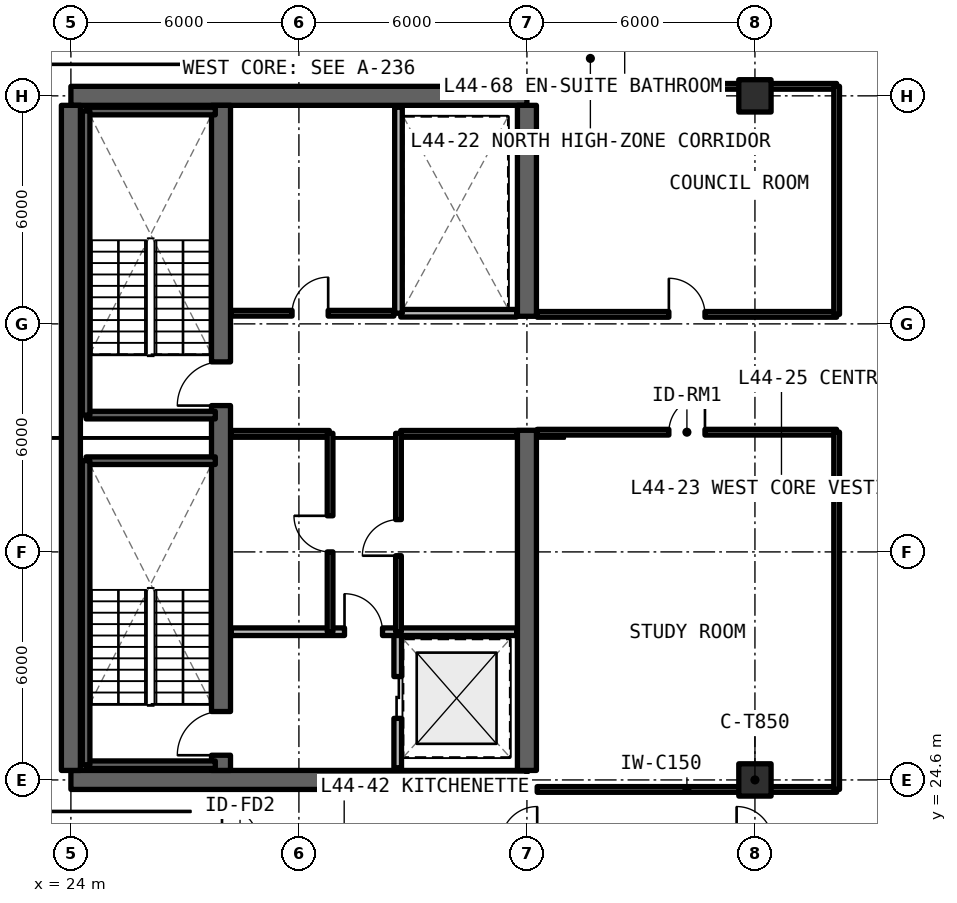
"""IFC4 building model, lengths in metres.
Left out: names, types, materials, properties, quantities, classifications, styles, units other than length and angle.
Written with IfcOpenShell. Run it as: python <this file> out.ifc"""

import sys

from ifc_helpers import new_model, si_unit, direction, frame, frame_2d, origin, origin_2d, place, context, subcontext, project, spatial, rectangle, extrude, element, fill, save


model = new_model("IFC4")
c1 = context("Model", 3, precision=1e-05, world=origin(), true_north=direction((0.0, 1.0)))
c2 = subcontext(c1, "Body", "Model", "MODEL_VIEW")
j1 = project(units=[si_unit("LENGTHUNIT", "METRE"), si_unit("PLANEANGLEUNIT", "RADIAN")], contexts=[c1])
p1 = place(None, origin())
s1 = spatial("IfcSite", under=j1, at=p1, CompositionType="ELEMENT")
p2 = place(p1, origin())
s2 = spatial("IfcBuilding", under=s1, at=p2, CompositionType="ELEMENT")
p3 = place(p2, frame((0.0, 0.0, 158.4)))
s3 = spatial("IfcBuildingStorey", under=s2, at=p3, CompositionType="ELEMENT", Elevation=158.4)
for number, where, z_axis, x_axis in (
    (1, (24.0, 24.6, 0.0), (0.0, 0.0, 1.0), (1.0, 0.0, 0.0)),
    (2, (36.0, 42.6, 0.0), (0.0, 0.0, 1.0), (-1.0, 0.0, 0.0)),
):
    element("IfcWall", number, at=place(p3, frame(where, z_axis=z_axis, x_axis=x_axis)), inside=s3, PredefinedType="SHEAR", context=c2, shape_type="SweptSolid", body=[
        extrude(rectangle(XDim=12.0, YDim=0.5, at=frame_2d((6.0, 0.0))), origin(), (0.0, 0.0, 1.0), 3.63),
    ])
p4 = place(p3, frame((24.0, 24.85, 0.0), z_axis=(0.0, 0.0, 1.0), x_axis=(0.0, 1.0, 0.0)))
e3 = element("IfcWall", 3, at=p4, inside=s3, PredefinedType="SHEAR", context=c2, shape_type="SweptSolid", body=[
    extrude(rectangle(XDim=17.5, YDim=0.5, at=frame_2d((8.75, 0.0))), origin(), (0.0, 0.0, 1.0), 3.63),
])
p5 = place(p3, frame((36.0, 24.85, 0.0), z_axis=(0.0, 0.0, 1.0), x_axis=(0.0, 1.0, 0.0)))
e4 = element("IfcWall", 4, at=p5, inside=s3, PredefinedType="SHEAR", context=c2, shape_type="SweptSolid", body=[
    extrude(rectangle(XDim=8.95, YDim=0.5, at=frame_2d((4.475, 0.0))), origin(), (0.0, 0.0, 1.0), 3.63),
])
p6 = place(p3, frame((36.0, 36.8, 0.0), z_axis=(0.0, 0.0, 1.0), x_axis=(0.0, 1.0, 0.0)))
e5 = element("IfcWall", 5, at=p6, inside=s3, PredefinedType="SHEAR", context=c2, shape_type="SweptSolid", body=[
    extrude(rectangle(XDim=5.55, YDim=0.5, at=frame_2d((2.775, 0.0))), origin(), (0.0, 0.0, 1.0), 3.63),
])
p7 = place(p3, frame((27.95, 24.85, 0.0), z_axis=(0.0, 0.0, 1.0), x_axis=(0.0, 1.0, 0.0)))
e6 = element("IfcWall", 6, at=p7, inside=s3, PredefinedType="SHEAR", context=c2, shape_type="SweptSolid", body=[
    extrude(rectangle(XDim=17.5, YDim=0.5, at=frame_2d((8.75, 0.0))), origin(), (0.0, 0.0, 1.0), 3.63),
])
p8 = place(p7, frame((0.4, 0.0, 0.0)))
e7 = element("IfcOpeningElement", 7, at=p8, cuts=e6, PredefinedType="OPENING", context=c2, shape_type="SweptSolid", body=[
    extrude(rectangle(XDim=1.15, YDim=2.15, at=frame_2d((0.575, 1.075))), frame((0.0, 0.26, 0.0), z_axis=(0.0, -1.0, 0.0), x_axis=(1.0, 0.0, 0.0)), (0.0, 0.0, 1.0), 0.52),
])
p9 = place(p7, frame((9.6, 0.0, 0.0)))
e8 = element("IfcOpeningElement", 8, at=p9, cuts=e6, PredefinedType="OPENING", context=c2, shape_type="SweptSolid", body=[
    extrude(rectangle(XDim=1.15, YDim=2.15, at=frame_2d((0.575, 1.075))), frame((0.0, 0.26, 0.0), z_axis=(0.0, -1.0, 0.0), x_axis=(1.0, 0.0, 0.0)), (0.0, 0.0, 1.0), 0.52),
])
for number, where, z_axis, x_axis in (
    (9, (42.0, 24.6, 0.0), (0.0, 0.0, 1.0), (1.0, 0.0, 0.0)),
    (10, (42.0, 42.6, 0.0), (0.0, 0.0, 1.0), (1.0, 0.0, 0.0)),
):
    element("IfcColumn", number, at=place(p3, frame(where, z_axis=z_axis, x_axis=x_axis)), inside=s3, PredefinedType="COLUMN", context=c2, shape_type="SweptSolid", body=[
        extrude(rectangle(XDim=0.85, YDim=0.85, at=origin_2d()), origin(), (0.0, 0.0, 1.0), 3.63),
    ])
p10 = place(p3, frame((32.6, 24.92, 0.0), z_axis=(0.0, 0.0, 1.0), x_axis=(0.0, 1.0, 0.0)))
e11 = element("IfcWall", 11, at=p10, inside=s3, PredefinedType="SOLIDWALL", context=c2, shape_type="SweptSolid", body=[
    extrude(rectangle(XDim=3.58, YDim=0.2, at=frame_2d((1.79, 0.0))), origin(), (0.0, 0.0, 1.0), 2.63),
])
p11 = place(p10, frame((1.3, 0.0, 0.0)))
e12 = element("IfcOpeningElement", 12, at=p11, cuts=e11, PredefinedType="OPENING", context=c2, shape_type="SweptSolid", body=[
    extrude(rectangle(XDim=1.1, YDim=2.2, at=frame_2d((0.55, 1.1))), frame((0.0, 0.11, 0.0), z_axis=(0.0, -1.0, 0.0), x_axis=(1.0, 0.0, 0.0)), (0.0, 0.0, 1.0), 0.22),
])
p12 = place(p3, frame((28.22, 28.5, 0.0), z_axis=(0.0, 0.0, 1.0), x_axis=(1.0, 0.0, 0.0)))
e13 = element("IfcWall", 13, at=p12, inside=s3, PredefinedType="SOLIDWALL", context=c2, shape_type="SweptSolid", body=[
    extrude(rectangle(XDim=7.51, YDim=0.2, at=frame_2d((3.755, 0.0))), origin(), (0.0, 0.0, 1.0), 2.63),
])
p13 = place(p12, frame((2.98, 0.0, 0.0)))
e14 = element("IfcOpeningElement", 14, at=p13, cuts=e13, PredefinedType="OPENING", context=c2, shape_type="SweptSolid", body=[
    extrude(rectangle(XDim=1.0, YDim=2.15, at=frame_2d((0.5, 1.075))), frame((0.0, 0.11, 0.0), z_axis=(0.0, -1.0, 0.0), x_axis=(1.0, 0.0, 0.0)), (0.0, 0.0, 1.0), 0.22),
])
p14 = place(p3, frame((28.22, 33.72, 0.0), z_axis=(0.0, 0.0, 1.0), x_axis=(1.0, 0.0, 0.0)))
e15 = element("IfcWall", 15, at=p14, inside=s3, PredefinedType="SOLIDWALL", context=c2, shape_type="SweptSolid", body=[
    extrude(rectangle(XDim=2.58, YDim=0.15, at=frame_2d((1.29, 0.0))), origin(), (0.0, 0.0, 1.0), 2.63),
])
p15 = place(p3, frame((30.82, 28.5, 0.0), z_axis=(0.0, 0.0, 1.0), x_axis=(0.0, 1.0, 0.0)))
e16 = element("IfcWall", 16, at=p15, inside=s3, PredefinedType="SOLIDWALL", context=c2, shape_type="SweptSolid", body=[
    extrude(rectangle(XDim=5.22, YDim=0.15, at=frame_2d((2.61, 0.0))), origin(), (0.0, 0.0, 1.0), 2.63),
])
p16 = place(p15, frame((2.1, 0.0, 0.0)))
e17 = element("IfcOpeningElement", 17, at=p16, cuts=e16, PredefinedType="OPENING", context=c2, shape_type="SweptSolid", body=[
    extrude(rectangle(XDim=0.95, YDim=2.15, at=frame_2d((0.475, 1.075))), frame((0.0, 0.085, 0.0), z_axis=(0.0, -1.0, 0.0), x_axis=(1.0, 0.0, 0.0)), (0.0, 0.0, 1.0), 0.17),
])
p17 = place(p3, frame((32.68, 33.72, 0.0), z_axis=(0.0, 0.0, 1.0), x_axis=(1.0, 0.0, 0.0)))
e18 = element("IfcWall", 18, at=p17, inside=s3, PredefinedType="SOLIDWALL", context=c2, shape_type="SweptSolid", body=[
    extrude(rectangle(XDim=3.05, YDim=0.15, at=frame_2d((1.525, 0.0))), origin(), (0.0, 0.0, 1.0), 2.63),
])
p18 = place(p3, frame((32.62, 28.5, 0.0), z_axis=(0.0, 0.0, 1.0), x_axis=(0.0, 1.0, 0.0)))
e19 = element("IfcWall", 19, at=p18, inside=s3, PredefinedType="SOLIDWALL", context=c2, shape_type="SweptSolid", body=[
    extrude(rectangle(XDim=5.22, YDim=0.15, at=frame_2d((2.61, 0.0))), origin(), (0.0, 0.0, 1.0), 2.63),
])
p19 = place(p18, frame((2.0, 0.0, 0.0)))
e20 = element("IfcOpeningElement", 20, at=p19, cuts=e19, PredefinedType="OPENING", context=c2, shape_type="SweptSolid", body=[
    extrude(rectangle(XDim=0.95, YDim=2.15, at=frame_2d((0.475, 1.075))), frame((0.0, 0.085, 0.0), z_axis=(0.0, -1.0, 0.0), x_axis=(1.0, 0.0, 0.0)), (0.0, 0.0, 1.0), 0.17),
])
p20 = place(p3, frame((28.22, 36.88, 0.0), z_axis=(0.0, 0.0, 1.0), x_axis=(1.0, 0.0, 0.0)))
e21 = element("IfcWall", 21, at=p20, inside=s3, PredefinedType="SOLIDWALL", context=c2, shape_type="SweptSolid", body=[
    extrude(rectangle(XDim=4.28, YDim=0.15, at=frame_2d((2.14, 0.0))), origin(), (0.0, 0.0, 1.0), 2.63),
])
p21 = place(p20, frame((1.6, 0.0, 0.0)))
e22 = element("IfcOpeningElement", 22, at=p21, cuts=e21, PredefinedType="OPENING", context=c2, shape_type="SweptSolid", body=[
    extrude(rectangle(XDim=0.95, YDim=2.15, at=frame_2d((0.475, 1.075))), frame((0.0, 0.085, 0.0), z_axis=(0.0, -1.0, 0.0), x_axis=(1.0, 0.0, 0.0)), (0.0, 0.0, 1.0), 0.17),
])
p22 = place(p3, frame((32.68, 36.88, 0.0), z_axis=(0.0, 0.0, 1.0), x_axis=(1.0, 0.0, 0.0)))
e23 = element("IfcWall", 23, at=p22, inside=s3, PredefinedType="SOLIDWALL", context=c2, shape_type="SweptSolid", body=[
    extrude(rectangle(XDim=3.05, YDim=0.2, at=frame_2d((1.525, 0.0))), origin(), (0.0, 0.0, 1.0), 2.63),
])
p23 = place(p3, frame((32.62, 36.88, 0.0), z_axis=(0.0, 0.0, 1.0), x_axis=(0.0, 1.0, 0.0)))
e24 = element("IfcWall", 24, at=p23, inside=s3, PredefinedType="SOLIDWALL", context=c2, shape_type="SweptSolid", body=[
    extrude(rectangle(XDim=5.42, YDim=0.2, at=frame_2d((2.71, 0.0))), origin(), (0.0, 0.0, 1.0), 2.63),
])
p24 = place(p3, frame((36.27, 24.35, 0.0), z_axis=(0.0, 0.0, 1.0), x_axis=(1.0, 0.0, 0.0)))
e25 = element("IfcWall", 25, at=p24, inside=s3, PredefinedType="SOLIDWALL", context=c2, shape_type="SweptSolid", body=[
    extrude(rectangle(XDim=7.88, YDim=0.15, at=frame_2d((3.94, 0.0))), origin(), (0.0, 0.0, 1.0), 2.63),
])
p25 = place(p3, frame((36.27, 33.75, 0.0), z_axis=(0.0, 0.0, 1.0), x_axis=(1.0, 0.0, 0.0)))
e26 = element("IfcWall", 26, at=p25, inside=s3, PredefinedType="SOLIDWALL", context=c2, shape_type="SweptSolid", body=[
    extrude(rectangle(XDim=7.88, YDim=0.15, at=frame_2d((3.94, 0.0))), origin(), (0.0, 0.0, 1.0), 2.63),
])
p26 = place(p25, frame((3.465, 0.0, 0.0)))
e27 = element("IfcOpeningElement", 27, at=p26, cuts=e26, PredefinedType="OPENING", context=c2, shape_type="SweptSolid", body=[
    extrude(rectangle(XDim=0.95, YDim=2.15, at=frame_2d((0.475, 1.075))), frame((0.0, 0.085, 0.0), z_axis=(0.0, -1.0, 0.0), x_axis=(1.0, 0.0, 0.0)), (0.0, 0.0, 1.0), 0.17),
])
p27 = place(p3, frame((44.15, 24.35, 0.0), z_axis=(0.0, 0.0, 1.0), x_axis=(0.0, 1.0, 0.0)))
e28 = element("IfcWall", 28, at=p27, inside=s3, PredefinedType="SOLIDWALL", context=c2, shape_type="SweptSolid", body=[
    extrude(rectangle(XDim=9.4, YDim=0.15, at=frame_2d((4.7, 0.0))), origin(), (0.0, 0.0, 1.0), 2.63),
])
p28 = place(p3, frame((36.27, 36.85, 0.0), z_axis=(0.0, 0.0, 1.0), x_axis=(1.0, 0.0, 0.0)))
e29 = element("IfcWall", 29, at=p28, inside=s3, PredefinedType="SOLIDWALL", context=c2, shape_type="SweptSolid", body=[
    extrude(rectangle(XDim=7.88, YDim=0.15, at=frame_2d((3.94, 0.0))), origin(), (0.0, 0.0, 1.0), 2.63),
])
p29 = place(p28, frame((3.465, 0.0, 0.0)))
e30 = element("IfcOpeningElement", 30, at=p29, cuts=e29, PredefinedType="OPENING", context=c2, shape_type="SweptSolid", body=[
    extrude(rectangle(XDim=0.95, YDim=2.15, at=frame_2d((0.475, 1.075))), frame((0.0, 0.085, 0.0), z_axis=(0.0, -1.0, 0.0), x_axis=(1.0, 0.0, 0.0)), (0.0, 0.0, 1.0), 0.17),
])
p30 = place(p3, frame((36.27, 42.85, 0.0), z_axis=(0.0, 0.0, 1.0), x_axis=(1.0, 0.0, 0.0)))
e31 = element("IfcWall", 31, at=p30, inside=s3, PredefinedType="SOLIDWALL", context=c2, shape_type="SweptSolid", body=[
    extrude(rectangle(XDim=7.88, YDim=0.15, at=frame_2d((3.94, 0.0))), origin(), (0.0, 0.0, 1.0), 2.63),
])
p31 = place(p3, frame((44.15, 36.85, 0.0), z_axis=(0.0, 0.0, 1.0), x_axis=(0.0, 1.0, 0.0)))
e32 = element("IfcWall", 32, at=p31, inside=s3, PredefinedType="SOLIDWALL", context=c2, shape_type="SweptSolid", body=[
    extrude(rectangle(XDim=6.0, YDim=0.15, at=frame_2d((3.0, 0.0))), origin(), (0.0, 0.0, 1.0), 2.63),
])
for number, where, z_axis, x_axis in (
    (33, (24.4, 25.0, 0.0), (0.0, 0.0, 1.0), (1.0, 0.0, 0.0)),
    (34, (27.8, 33.0, 0.0), (0.0, 0.0, 1.0), (-1.0, 0.0, 0.0)),
):
    element("IfcWall", number, at=place(p3, frame(where, z_axis=z_axis, x_axis=x_axis)), inside=s3, PredefinedType="SOLIDWALL", context=c2, shape_type="SweptSolid", body=[
        extrude(rectangle(XDim=3.4, YDim=0.2, at=frame_2d((1.7, 0.0))), origin(), (0.0, 0.0, 1.0), 3.63),
    ])
p32 = place(p3, frame((24.4, 33.0, 0.0), z_axis=(0.0, 0.0, 1.0), x_axis=(0.0, -1.0, 0.0)))
e35 = element("IfcWall", 35, at=p32, inside=s3, PredefinedType="SOLIDWALL", context=c2, shape_type="SweptSolid", body=[
    extrude(rectangle(XDim=8.0, YDim=0.2, at=frame_2d((4.0, 0.0))), origin(), (0.0, 0.0, 1.0), 3.63),
])
for number, where, z_axis, x_axis in (
    (36, (24.4, 34.2, 0.0), (0.0, 0.0, 1.0), (1.0, 0.0, 0.0)),
    (37, (27.8, 42.2, 0.0), (0.0, 0.0, 1.0), (-1.0, 0.0, 0.0)),
):
    element("IfcWall", number, at=place(p3, frame(where, z_axis=z_axis, x_axis=x_axis)), inside=s3, PredefinedType="SOLIDWALL", context=c2, shape_type="SweptSolid", body=[
        extrude(rectangle(XDim=3.4, YDim=0.2, at=frame_2d((1.7, 0.0))), origin(), (0.0, 0.0, 1.0), 3.63),
    ])
p33 = place(p3, frame((24.4, 42.2, 0.0), z_axis=(0.0, 0.0, 1.0), x_axis=(0.0, -1.0, 0.0)))
e38 = element("IfcWall", 38, at=p33, inside=s3, PredefinedType="SOLIDWALL", context=c2, shape_type="SweptSolid", body=[
    extrude(rectangle(XDim=8.0, YDim=0.2, at=frame_2d((4.0, 0.0))), origin(), (0.0, 0.0, 1.0), 3.63),
])
p34 = place(p11, origin())
e39 = element("IfcDoor", 39, at=p34, inside=s3, OperationType="SLIDING_TO_LEFT", PredefinedType="DOOR", context=c2, shape_type="SweptSolid", body=[
    extrude(rectangle(XDim=1.1, YDim=2.2, at=frame_2d((0.55, 1.1))), frame((0.0, 0.025, 0.0), z_axis=(0.0, -1.0, 0.0), x_axis=(1.0, 0.0, 0.0)), (0.0, 0.0, 1.0), 0.05),
])
fill(e12, e39)
p35 = place(p13, origin())
e40 = element("IfcDoor", 40, at=p35, inside=s3, OperationType="SINGLE_SWING_LEFT", PredefinedType="DOOR", context=c2, shape_type="SweptSolid", body=[
    extrude(rectangle(XDim=1.0, YDim=2.15, at=frame_2d((0.5, 1.075))), frame((0.0, 0.025, 0.0), z_axis=(0.0, -1.0, 0.0), x_axis=(1.0, 0.0, 0.0)), (0.0, 0.0, 1.0), 0.05),
])
fill(e14, e40)
p36 = place(p16, origin())
e41 = element("IfcDoor", 41, at=p36, inside=s3, OperationType="SINGLE_SWING_RIGHT", PredefinedType="DOOR", context=c2, shape_type="SweptSolid", body=[
    extrude(rectangle(XDim=0.95, YDim=2.15, at=frame_2d((0.475, 1.075))), frame((0.0, 0.025, 0.0), z_axis=(0.0, -1.0, 0.0), x_axis=(1.0, 0.0, 0.0)), (0.0, 0.0, 1.0), 0.05),
])
fill(e17, e41)
p37 = place(p19, origin())
e42 = element("IfcDoor", 42, at=p37, inside=s3, OperationType="SINGLE_SWING_LEFT", PredefinedType="DOOR", context=c2, shape_type="SweptSolid", body=[
    extrude(rectangle(XDim=0.95, YDim=2.15, at=frame_2d((0.475, 1.075))), frame((0.0, 0.025, 0.0), z_axis=(0.0, -1.0, 0.0), x_axis=(1.0, 0.0, 0.0)), (0.0, 0.0, 1.0), 0.05),
])
fill(e20, e42)
p38 = place(p21, origin())
e43 = element("IfcDoor", 43, at=p38, inside=s3, OperationType="SINGLE_SWING_RIGHT", PredefinedType="DOOR", context=c2, shape_type="SweptSolid", body=[
    extrude(rectangle(XDim=0.95, YDim=2.15, at=frame_2d((0.475, 1.075))), frame((0.0, 0.025, 0.0), z_axis=(0.0, -1.0, 0.0), x_axis=(1.0, 0.0, 0.0)), (0.0, 0.0, 1.0), 0.05),
])
fill(e22, e43)
p39 = place(p26, origin())
e44 = element("IfcDoor", 44, at=p39, inside=s3, OperationType="SINGLE_SWING_RIGHT", PredefinedType="DOOR", context=c2, shape_type="SweptSolid", body=[
    extrude(rectangle(XDim=0.95, YDim=2.15, at=frame_2d((0.475, 1.075))), frame((0.0, 0.025, 0.0), z_axis=(0.0, -1.0, 0.0), x_axis=(1.0, 0.0, 0.0)), (0.0, 0.0, 1.0), 0.05),
])
fill(e27, e44)
p40 = place(p29, origin())
e45 = element("IfcDoor", 45, at=p40, inside=s3, OperationType="SINGLE_SWING_LEFT", PredefinedType="DOOR", context=c2, shape_type="SweptSolid", body=[
    extrude(rectangle(XDim=0.95, YDim=2.15, at=frame_2d((0.475, 1.075))), frame((0.0, 0.025, 0.0), z_axis=(0.0, -1.0, 0.0), x_axis=(1.0, 0.0, 0.0)), (0.0, 0.0, 1.0), 0.05),
])
fill(e30, e45)
p41 = place(p8, origin())
e46 = element("IfcDoor", 46, at=p41, inside=s3, OperationType="SINGLE_SWING_LEFT", PredefinedType="DOOR", context=c2, shape_type="SweptSolid", body=[
    extrude(rectangle(XDim=1.15, YDim=2.15, at=frame_2d((0.575, 1.075))), frame((0.0, 0.025, 0.0), z_axis=(0.0, -1.0, 0.0), x_axis=(1.0, 0.0, 0.0)), (0.0, 0.0, 1.0), 0.05),
])
fill(e7, e46)
p42 = place(p9, origin())
e47 = element("IfcDoor", 47, at=p42, inside=s3, OperationType="SINGLE_SWING_RIGHT", PredefinedType="DOOR", context=c2, shape_type="SweptSolid", body=[
    extrude(rectangle(XDim=1.15, YDim=2.15, at=frame_2d((0.575, 1.075))), frame((0.0, 0.025, 0.0), z_axis=(0.0, -1.0, 0.0), x_axis=(1.0, 0.0, 0.0)), (0.0, 0.0, 1.0), 0.05),
])
fill(e8, e47)
save(model, sys.argv[1])
